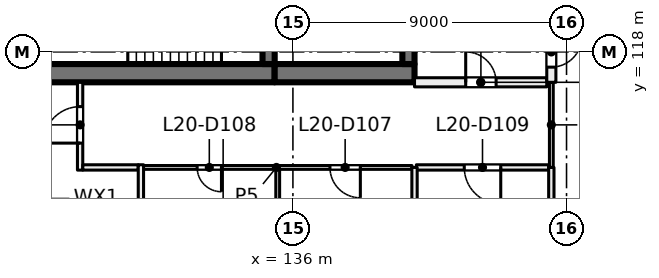
"""IFC4 building model, lengths in metres.
Left out: names, types, materials, properties, quantities, classifications, styles, units other than length and angle.
Written with IfcOpenShell. Run it as: python <this file> out.ifc"""

import sys

from ifc_helpers import new_model, si_unit, direction, frame, frame_2d, origin, place, context, subcontext, project, spatial, rectangle, extrude, element, fill, save


model = new_model("IFC4")
c1 = context("Model", 3, precision=1e-05, world=origin(), true_north=direction((0.0, 1.0)))
c2 = subcontext(c1, "Body", "Model", "MODEL_VIEW")
j1 = project(units=[si_unit("LENGTHUNIT", "METRE"), si_unit("PLANEANGLEUNIT", "RADIAN")], contexts=[c1])
p1 = place(None, origin())
s1 = spatial("IfcSite", under=j1, at=p1, CompositionType="ELEMENT")
p2 = place(p1, origin())
s2 = spatial("IfcBuilding", under=s1, at=p2, CompositionType="ELEMENT")
p3 = place(p2, frame((0.0, 0.0, 89.0)))
s3 = spatial("IfcBuildingStorey", under=s2, at=p3, CompositionType="ELEMENT", Elevation=89.0)
p4 = place(p3, frame((127.6, 117.3, 0.0), z_axis=(0.0, 0.0, 1.0), x_axis=(1.0, 0.0, 0.0)))
e1 = element("IfcWall", 1, at=p4, inside=s3, PredefinedType="SHEAR", context=c2, shape_type="SweptSolid", body=[
    extrude(rectangle(XDim=7.8, YDim=0.6, at=frame_2d((3.9, 0.0))), origin(), (0.0, 0.0, 1.0), 4.0),
])
p5 = place(p3, frame((135.4, 117.3, 0.0), z_axis=(0.0, 0.0, 1.0), x_axis=(1.0, 0.0, 0.0)))
e2 = element("IfcWall", 2, at=p5, inside=s3, PredefinedType="SHEAR", context=c2, shape_type="SweptSolid", body=[
    extrude(rectangle(XDim=4.6, YDim=0.6, at=frame_2d((2.3, 0.0))), origin(), (0.0, 0.0, 1.0), 4.0),
])
p6 = place(p3, frame((135.2, 117.6, 0.0), z_axis=(0.0, 0.0, 1.0), x_axis=(0.0, 1.0, 0.0)))
e3 = element("IfcWall", 3, at=p6, inside=s3, PredefinedType="SHEAR", context=c2, shape_type="SweptSolid", body=[
    extrude(rectangle(XDim=2.8, YDim=0.4, at=frame_2d((1.4, 0.0))), origin(), (0.0, 0.0, 1.0), 4.0),
])
p7 = place(p6, frame((0.9, 0.0, 0.0)))
e4 = element("IfcOpeningElement", 4, at=p7, cuts=e3, PredefinedType="OPENING", context=c2, shape_type="SweptSolid", body=[
    extrude(rectangle(XDim=1.0, YDim=2.1, at=frame_2d((0.5, 1.05))), frame((0.0, 0.21, 0.0), z_axis=(0.0, -1.0, 0.0), x_axis=(1.0, 0.0, 0.0)), (0.0, 0.0, 1.0), 0.42),
])
p8 = place(p3, frame((139.8, 117.6, 0.0), z_axis=(0.0, 0.0, 1.0), x_axis=(0.0, 1.0, 0.0)))
e5 = element("IfcWall", 5, at=p8, inside=s3, PredefinedType="SHEAR", context=c2, shape_type="SweptSolid", body=[
    extrude(rectangle(XDim=8.6, YDim=0.4, at=frame_2d((4.3, 0.0))), origin(), (0.0, 0.0, 1.0), 4.0),
])
p9 = place(p3, frame((129.0, 114.112, 0.0), z_axis=(0.0, 0.0, 1.0), x_axis=(0.0, 1.0, 0.0)))
e6 = element("IfcWall", 6, at=p9, inside=s3, PredefinedType="PARTITIONING", context=c2, shape_type="SweptSolid", body=[
    extrude(rectangle(XDim=2.888, YDim=0.175, at=frame_2d((1.444, 0.0))), origin(), (0.0, 0.0, 1.0), 3.625),
])
p10 = place(p9, frame((0.888, 0.0, 0.0)))
e7 = element("IfcOpeningElement", 7, at=p10, cuts=e6, PredefinedType="OPENING", context=c2, shape_type="SweptSolid", body=[
    extrude(rectangle(XDim=1.2, YDim=2.1, at=frame_2d((0.6, 1.05))), frame((0.0, 0.097, 0.0), z_axis=(0.0, -1.0, 0.0), x_axis=(1.0, 0.0, 0.0)), (0.0, 0.0, 1.0), 0.195),
])
p11 = place(p3, frame((130.912, 114.2, 0.0), z_axis=(0.0, 0.0, 1.0), x_axis=(-1.0, 0.0, 0.0)))
e8 = element("IfcWall", 8, at=p11, inside=s3, PredefinedType="PARTITIONING", context=c2, shape_type="SweptSolid", body=[
    extrude(rectangle(XDim=1.824, YDim=0.175, at=frame_2d((0.912, 0.0))), origin(), (0.0, 0.0, 1.0), 3.625),
])
p12 = place(p3, frame((139.916, 114.2, 0.0), z_axis=(0.0, 0.0, 1.0), x_axis=(-1.0, 0.0, 0.0)))
e9 = element("IfcWall", 9, at=p12, inside=s3, PredefinedType="PARTITIONING", context=c2, shape_type="SweptSolid", body=[
    extrude(rectangle(XDim=8.919, YDim=0.125, at=frame_2d((4.459, 0.0))), origin(), (0.0, 0.0, 1.0), 3.625),
])
p13 = place(p12, frame((1.698, 0.0, 0.0)))
e10 = element("IfcOpeningElement", 10, at=p13, cuts=e9, PredefinedType="OPENING", context=c2, shape_type="SweptSolid", body=[
    extrude(rectangle(XDim=1.0, YDim=2.1, at=frame_2d((0.5, 1.05))), frame((0.0, 0.073, 0.0), z_axis=(0.0, -1.0, 0.0), x_axis=(1.0, 0.0, 0.0)), (0.0, 0.0, 1.0), 0.145),
])
p14 = place(p12, frame((6.266, 0.0, 0.0)))
e11 = element("IfcOpeningElement", 11, at=p14, cuts=e9, PredefinedType="OPENING", context=c2, shape_type="SweptSolid", body=[
    extrude(rectangle(XDim=0.8, YDim=2.1, at=frame_2d((0.4, 1.05))), frame((0.0, 0.073, 0.0), z_axis=(0.0, -1.0, 0.0), x_axis=(1.0, 0.0, 0.0)), (0.0, 0.0, 1.0), 0.145),
])
p15 = place(p3, frame((131.0, 114.288, 0.0), z_axis=(0.0, 0.0, 1.0), x_axis=(0.0, -1.0, 0.0)))
e12 = element("IfcWall", 12, at=p15, inside=s3, PredefinedType="PARTITIONING", context=c2, shape_type="SweptSolid", body=[
    extrude(rectangle(XDim=3.667, YDim=0.175, at=frame_2d((1.833, 0.0))), origin(), (0.0, 0.0, 1.0), 3.625),
])
p16 = place(p3, frame((135.5, 110.6, 0.0), z_axis=(0.0, 0.0, 1.0), x_axis=(0.0, 1.0, 0.0)))
e13 = element("IfcWall", 13, at=p16, inside=s3, PredefinedType="PARTITIONING", context=c2, shape_type="SweptSolid", body=[
    extrude(rectangle(XDim=3.538, YDim=0.125, at=frame_2d((1.769, 0.0))), origin(), (0.0, 0.0, 1.0), 3.625),
])
p17 = place(p3, frame((144.412, 114.2, 0.0), z_axis=(0.0, 0.0, 1.0), x_axis=(-1.0, 0.0, 0.0)))
e14 = element("IfcWall", 14, at=p17, inside=s3, PredefinedType="PARTITIONING", context=c2, shape_type="SweptSolid", body=[
    extrude(rectangle(XDim=4.352, YDim=0.175, at=frame_2d((2.176, 0.0))), origin(), (0.0, 0.0, 1.0), 3.625),
])
p18 = place(p17, frame((1.576, 0.0, 0.0)))
e15 = element("IfcOpeningElement", 15, at=p18, cuts=e14, PredefinedType="OPENING", context=c2, shape_type="SweptSolid", body=[
    extrude(rectangle(XDim=1.2, YDim=2.1, at=frame_2d((0.6, 1.05))), frame((0.0, 0.097, 0.0), z_axis=(0.0, -1.0, 0.0), x_axis=(1.0, 0.0, 0.0)), (0.0, 0.0, 1.0), 0.195),
])
for number, where, z_axis, x_axis in (
    (16, (140.0, 110.6, 0.0), (0.0, 0.0, 1.0), (0.0, 1.0, 0.0)),
    (17, (144.5, 114.2, 0.0), (0.0, 0.0, 1.0), (0.0, -1.0, 0.0)),
):
    element("IfcWall", number, at=place(p3, frame(where, z_axis=z_axis, x_axis=x_axis)), inside=s3, PredefinedType="PARTITIONING", context=c2, shape_type="SweptSolid", body=[
        extrude(rectangle(XDim=3.6, YDim=0.175, at=frame_2d((1.8, 0.0))), origin(), (0.0, 0.0, 1.0), 3.625),
    ])
p19 = place(p3, frame((140.0, 117.0, 0.0), z_axis=(0.0, 0.0, 1.0), x_axis=(1.0, 0.0, 0.0)))
e18 = element("IfcWall", 18, at=p19, inside=s3, PredefinedType="PARTITIONING", context=c2, shape_type="SweptSolid", body=[
    extrude(rectangle(XDim=4.35, YDim=0.3, at=frame_2d((2.175, 0.0))), origin(), (0.0, 0.0, 1.0), 3.625),
])
p20 = place(p19, frame((1.684, 0.0, 0.0)))
e19 = element("IfcOpeningElement", 19, at=p20, cuts=e18, PredefinedType="OPENING", context=c2, shape_type="SweptSolid", body=[
    extrude(rectangle(XDim=1.0, YDim=2.1, at=frame_2d((0.5, 1.05))), frame((0.0, 0.16, 0.0), z_axis=(0.0, -1.0, 0.0), x_axis=(1.0, 0.0, 0.0)), (0.0, 0.0, 1.0), 0.32),
])
p21 = place(p3, frame((144.5, 117.0, 0.0), z_axis=(0.0, 0.0, 1.0), x_axis=(0.0, -1.0, 0.0)))
e20 = element("IfcWall", 20, at=p21, inside=s3, PredefinedType="PARTITIONING", context=c2, shape_type="SweptSolid", body=[
    extrude(rectangle(XDim=2.8, YDim=0.125, at=frame_2d((1.4, 0.0))), origin(), (0.0, 0.0, 1.0), 3.625),
])
p22 = place(p3, frame((144.5, 139.0, 0.0), z_axis=(0.0, 0.0, 1.0), x_axis=(0.0, -1.0, 0.0)))
e21 = element("IfcWall", 21, at=p22, inside=s3, PredefinedType="PARTITIONING", context=c2, shape_type="SweptSolid", body=[
    extrude(rectangle(XDim=22.0, YDim=0.3, at=frame_2d((11.0, 0.0))), origin(), (0.0, 0.0, 1.0), 3.625),
])
p23 = place(p22, frame((20.501, 0.0, 0.0)))
e22 = element("IfcOpeningElement", 22, at=p23, cuts=e21, PredefinedType="OPENING", context=c2, shape_type="SweptSolid", body=[
    extrude(rectangle(XDim=1.0, YDim=2.1, at=frame_2d((0.5, 1.05))), frame((0.0, 0.16, 0.0), z_axis=(0.0, -1.0, 0.0), x_axis=(1.0, 0.0, 0.0)), (0.0, 0.0, 1.0), 0.32),
])
p24 = place(p22, frame((15.0, 0.0, 0.0)))
e23 = element("IfcOpeningElement", 23, at=p24, cuts=e21, PredefinedType="OPENING", context=c2, shape_type="SweptSolid", body=[
    extrude(rectangle(XDim=1.0, YDim=2.1, at=frame_2d((0.5, 1.05))), frame((0.0, 0.16, 0.0), z_axis=(0.0, -1.0, 0.0), x_axis=(1.0, 0.0, 0.0)), (0.0, 0.0, 1.0), 0.32),
])
p25 = place(p22, frame((6.0, 0.0, 0.0)))
e24 = element("IfcOpeningElement", 24, at=p25, cuts=e21, PredefinedType="OPENING", context=c2, shape_type="SweptSolid", body=[
    extrude(rectangle(XDim=1.0, YDim=2.1, at=frame_2d((0.5, 1.05))), frame((0.0, 0.16, 0.0), z_axis=(0.0, -1.0, 0.0), x_axis=(1.0, 0.0, 0.0)), (0.0, 0.0, 1.0), 0.32),
])
p26 = place(p22, frame((0.398, 0.0, 0.0)))
e25 = element("IfcOpeningElement", 25, at=p26, cuts=e21, PredefinedType="OPENING", context=c2, shape_type="SweptSolid", body=[
    extrude(rectangle(XDim=1.2, YDim=2.1, at=frame_2d((0.6, 1.05))), frame((0.0, 0.16, 0.0), z_axis=(0.0, -1.0, 0.0), x_axis=(1.0, 0.0, 0.0)), (0.0, 0.0, 1.0), 0.32),
])
p27 = place(p23, origin())
e26 = element("IfcDoor", 26, at=p27, inside=s3, OperationType="SINGLE_SWING_LEFT", PredefinedType="DOOR", context=c2, shape_type="SweptSolid", body=[
    extrude(rectangle(XDim=1.0, YDim=2.1, at=frame_2d((0.5, 1.05))), frame((0.0, 0.025, 0.0), z_axis=(0.0, -1.0, 0.0), x_axis=(1.0, 0.0, 0.0)), (0.0, 0.0, 1.0), 0.05),
])
fill(e22, e26)
p28 = place(p20, origin())
e27 = element("IfcDoor", 27, at=p28, inside=s3, OperationType="SINGLE_SWING_LEFT", PredefinedType="DOOR", context=c2, shape_type="SweptSolid", body=[
    extrude(rectangle(XDim=1.0, YDim=2.1, at=frame_2d((0.5, 1.05))), frame((0.0, 0.025, 0.0), z_axis=(0.0, -1.0, 0.0), x_axis=(1.0, 0.0, 0.0)), (0.0, 0.0, 1.0), 0.05),
])
fill(e19, e27)
p29 = place(p13, origin())
e28 = element("IfcDoor", 28, at=p29, inside=s3, OperationType="SINGLE_SWING_LEFT", PredefinedType="DOOR", context=c2, shape_type="SweptSolid", body=[
    extrude(rectangle(XDim=1.0, YDim=2.1, at=frame_2d((0.5, 1.05))), frame((0.0, 0.025, 0.0), z_axis=(0.0, -1.0, 0.0), x_axis=(1.0, 0.0, 0.0)), (0.0, 0.0, 1.0), 0.05),
])
fill(e10, e28)
p30 = place(p14, origin())
e29 = element("IfcDoor", 29, at=p30, inside=s3, OperationType="SINGLE_SWING_RIGHT", PredefinedType="DOOR", context=c2, shape_type="SweptSolid", body=[
    extrude(rectangle(XDim=0.8, YDim=2.1, at=frame_2d((0.4, 1.05))), frame((0.0, 0.025, 0.0), z_axis=(0.0, -1.0, 0.0), x_axis=(1.0, 0.0, 0.0)), (0.0, 0.0, 1.0), 0.05),
])
fill(e11, e29)
p31 = place(p18, origin())
e30 = element("IfcDoor", 30, at=p31, inside=s3, OperationType="DOUBLE_DOOR_SINGLE_SWING", PredefinedType="DOOR", context=c2, shape_type="SweptSolid", body=[
    extrude(rectangle(XDim=1.2, YDim=2.1, at=frame_2d((0.6, 1.05))), frame((0.0, 0.025, 0.0), z_axis=(0.0, -1.0, 0.0), x_axis=(1.0, 0.0, 0.0)), (0.0, 0.0, 1.0), 0.05),
])
fill(e15, e30)
p32 = place(p10, origin())
e31 = element("IfcDoor", 31, at=p32, inside=s3, OperationType="DOUBLE_DOOR_SINGLE_SWING", PredefinedType="DOOR", context=c2, shape_type="SweptSolid", body=[
    extrude(rectangle(XDim=1.2, YDim=2.1, at=frame_2d((0.6, 1.05))), frame((0.0, 0.025, 0.0), z_axis=(0.0, -1.0, 0.0), x_axis=(1.0, 0.0, 0.0)), (0.0, 0.0, 1.0), 0.05),
])
fill(e7, e31)
save(model, sys.argv[1])
